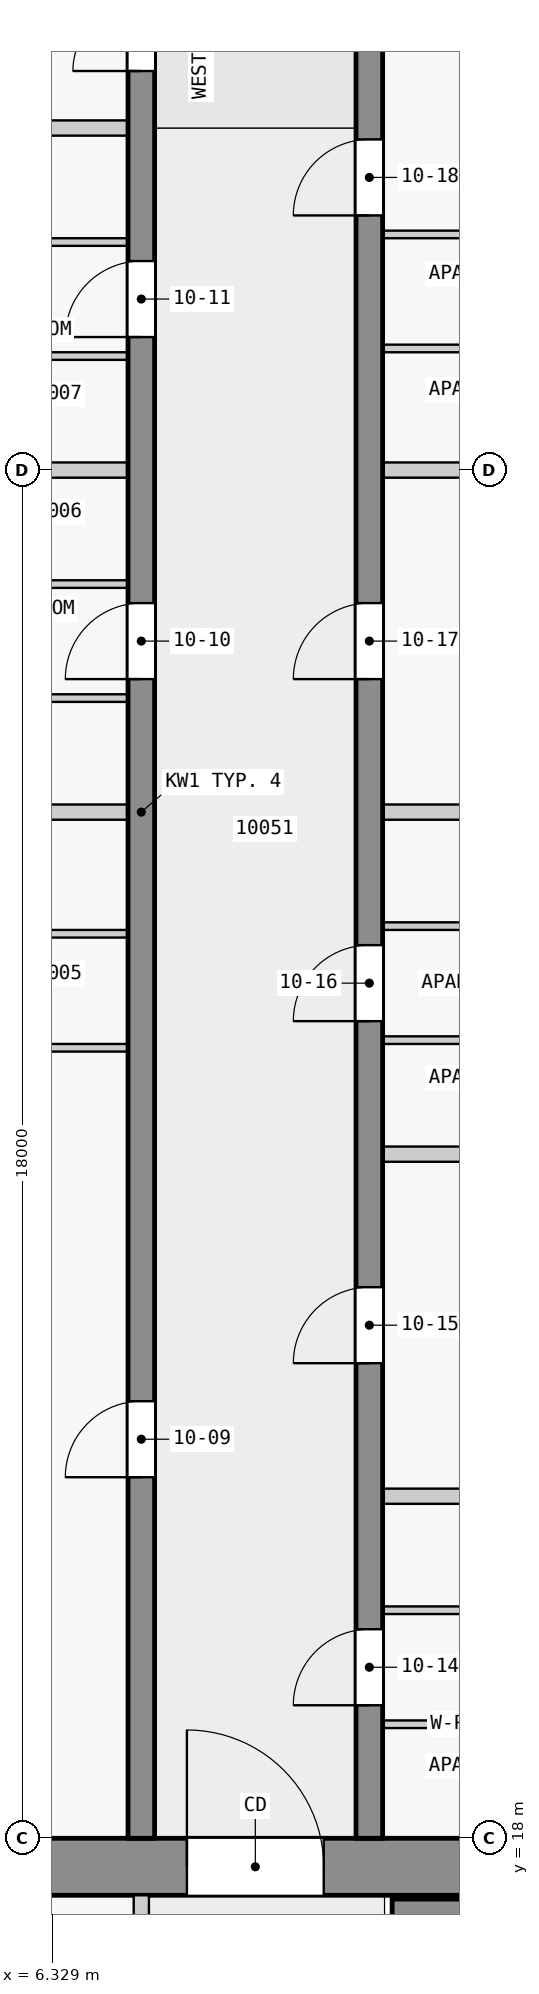
"""IFC4 building model, lengths in metres.
Left out: names, types, materials, properties, quantities, classifications, styles, units other than length and angle.
Written with IfcOpenShell. Run it as: python <this file> out.ifc"""

import sys

from ifc_helpers import new_model, si_unit, direction, frame, frame_2d, origin, place, context, subcontext, project, spatial, rectangle, extrude, element, fill, save


model = new_model("IFC4")
c1 = context("Model", 3, precision=1e-05, world=origin(), true_north=direction((0.0, 1.0)))
c2 = subcontext(c1, "Body", "Model", "MODEL_VIEW")
j1 = project(units=[si_unit("LENGTHUNIT", "METRE"), si_unit("PLANEANGLEUNIT", "RADIAN")], contexts=[c1])
p1 = place(None, origin())
s1 = spatial("IfcSite", under=j1, at=p1, CompositionType="ELEMENT")
p2 = place(p1, origin())
s2 = spatial("IfcBuilding", under=s1, at=p2, CompositionType="ELEMENT")
p3 = place(p2, frame((0.0, 0.0, 44.3)))
s3 = spatial("IfcBuildingStorey", under=s2, at=p3, CompositionType="ELEMENT", Elevation=44.3)
p4 = place(p3, frame((1.55, 17.625, 0.0), z_axis=(0.0, 0.0, 1.0), x_axis=(1.0, 0.0, 0.0)))
e1 = element("IfcWall", 1, at=p4, inside=s3, PredefinedType="SHEAR", context=c2, shape_type="SweptSolid", body=[
    extrude(rectangle(XDim=20.95, YDim=0.75, at=frame_2d((10.475, 0.0))), origin(), (0.0, 0.0, 1.0), 3.25),
])
p5 = place(p4, frame((6.55, 0.0, 0.0)))
e2 = element("IfcOpeningElement", 2, at=p5, cuts=e1, PredefinedType="OPENING", context=c2, shape_type="SweptSolid", body=[
    extrude(rectangle(XDim=1.8, YDim=2.1, at=frame_2d((0.9, 1.05))), frame((0.0, 0.385, 0.0), z_axis=(0.0, -1.0, 0.0), x_axis=(1.0, 0.0, 0.0)), (0.0, 0.0, 1.0), 0.77),
])
p6 = place(p3, frame((10.8, 17.05, 0.0), z_axis=(0.0, 0.0, 1.0), x_axis=(1.0, 0.0, 0.0)))
e3 = element("IfcWall", 3, at=p6, inside=s3, PredefinedType="SHEAR", context=c2, shape_type="SweptSolid", body=[
    extrude(rectangle(XDim=7.8, YDim=0.3, at=frame_2d((3.9, 0.0))), origin(), (0.0, 0.0, 1.0), 3.25),
])
p7 = place(p3, frame((7.5, 18.0, 0.0), z_axis=(0.0, 0.0, 1.0), x_axis=(0.0, 1.0, 0.0)))
e4 = element("IfcWall", 4, at=p7, inside=s3, PredefinedType="SHEAR", context=c2, shape_type="SweptSolid", body=[
    extrude(rectangle(XDim=27.0, YDim=0.35, at=frame_2d((13.5, 0.0))), origin(), (0.0, 0.0, 1.0), 3.25),
])
p8 = place(p7, frame((4.75, 0.0, 0.0)))
e5 = element("IfcOpeningElement", 5, at=p8, cuts=e4, PredefinedType="OPENING", context=c2, shape_type="SweptSolid", body=[
    extrude(rectangle(XDim=1.0, YDim=2.1, at=frame_2d((0.5, 1.05))), frame((0.0, 0.185, 0.0), z_axis=(0.0, -1.0, 0.0), x_axis=(1.0, 0.0, 0.0)), (0.0, 0.0, 1.0), 0.37),
])
p9 = place(p7, frame((15.25, 0.0, 0.0)))
e6 = element("IfcOpeningElement", 6, at=p9, cuts=e4, PredefinedType="OPENING", context=c2, shape_type="SweptSolid", body=[
    extrude(rectangle(XDim=1.0, YDim=2.1, at=frame_2d((0.5, 1.05))), frame((0.0, 0.185, 0.0), z_axis=(0.0, -1.0, 0.0), x_axis=(1.0, 0.0, 0.0)), (0.0, 0.0, 1.0), 0.37),
])
p10 = place(p7, frame((19.75, 0.0, 0.0)))
e7 = element("IfcOpeningElement", 7, at=p10, cuts=e4, PredefinedType="OPENING", context=c2, shape_type="SweptSolid", body=[
    extrude(rectangle(XDim=1.0, YDim=2.1, at=frame_2d((0.5, 1.05))), frame((0.0, 0.185, 0.0), z_axis=(0.0, -1.0, 0.0), x_axis=(1.0, 0.0, 0.0)), (0.0, 0.0, 1.0), 0.37),
])
p11 = place(p7, frame((23.25, 0.0, 0.0)))
e8 = element("IfcOpeningElement", 8, at=p11, cuts=e4, PredefinedType="OPENING", context=c2, shape_type="SweptSolid", body=[
    extrude(rectangle(XDim=0.9, YDim=2.1, at=frame_2d((0.45, 1.05))), frame((0.0, 0.185, 0.0), z_axis=(0.0, -1.0, 0.0), x_axis=(1.0, 0.0, 0.0)), (0.0, 0.0, 1.0), 0.37),
])
p12 = place(p7, frame((25.45, 0.0, 0.0)))
e9 = element("IfcOpeningElement", 9, at=p12, cuts=e4, PredefinedType="OPENING", context=c2, shape_type="SweptSolid", body=[
    extrude(rectangle(XDim=1.0, YDim=2.1, at=frame_2d((0.5, 1.05))), frame((0.0, 0.185, 0.0), z_axis=(0.0, -1.0, 0.0), x_axis=(1.0, 0.0, 0.0)), (0.0, 0.0, 1.0), 0.37),
])
p13 = place(p3, frame((10.5, 18.0, 0.0), z_axis=(0.0, 0.0, 1.0), x_axis=(0.0, 1.0, 0.0)))
e10 = element("IfcWall", 10, at=p13, inside=s3, PredefinedType="SHEAR", context=c2, shape_type="SweptSolid", body=[
    extrude(rectangle(XDim=27.0, YDim=0.35, at=frame_2d((13.5, 0.0))), origin(), (0.0, 0.0, 1.0), 3.25),
])
p14 = place(p13, frame((1.75, 0.0, 0.0)))
e11 = element("IfcOpeningElement", 11, at=p14, cuts=e10, PredefinedType="OPENING", context=c2, shape_type="SweptSolid", body=[
    extrude(rectangle(XDim=1.0, YDim=2.1, at=frame_2d((0.5, 1.05))), frame((0.0, 0.185, 0.0), z_axis=(0.0, -1.0, 0.0), x_axis=(1.0, 0.0, 0.0)), (0.0, 0.0, 1.0), 0.37),
])
p15 = place(p13, frame((6.25, 0.0, 0.0)))
e12 = element("IfcOpeningElement", 12, at=p15, cuts=e10, PredefinedType="OPENING", context=c2, shape_type="SweptSolid", body=[
    extrude(rectangle(XDim=1.0, YDim=2.1, at=frame_2d((0.5, 1.05))), frame((0.0, 0.185, 0.0), z_axis=(0.0, -1.0, 0.0), x_axis=(1.0, 0.0, 0.0)), (0.0, 0.0, 1.0), 0.37),
])
p16 = place(p13, frame((10.75, 0.0, 0.0)))
e13 = element("IfcOpeningElement", 13, at=p16, cuts=e10, PredefinedType="OPENING", context=c2, shape_type="SweptSolid", body=[
    extrude(rectangle(XDim=1.0, YDim=2.1, at=frame_2d((0.5, 1.05))), frame((0.0, 0.185, 0.0), z_axis=(0.0, -1.0, 0.0), x_axis=(1.0, 0.0, 0.0)), (0.0, 0.0, 1.0), 0.37),
])
p17 = place(p13, frame((15.25, 0.0, 0.0)))
e14 = element("IfcOpeningElement", 14, at=p17, cuts=e10, PredefinedType="OPENING", context=c2, shape_type="SweptSolid", body=[
    extrude(rectangle(XDim=1.0, YDim=2.1, at=frame_2d((0.5, 1.05))), frame((0.0, 0.185, 0.0), z_axis=(0.0, -1.0, 0.0), x_axis=(1.0, 0.0, 0.0)), (0.0, 0.0, 1.0), 0.37),
])
p18 = place(p13, frame((21.35, 0.0, 0.0)))
e15 = element("IfcOpeningElement", 15, at=p18, cuts=e10, PredefinedType="OPENING", context=c2, shape_type="SweptSolid", body=[
    extrude(rectangle(XDim=1.0, YDim=2.1, at=frame_2d((0.5, 1.05))), frame((0.0, 0.185, 0.0), z_axis=(0.0, -1.0, 0.0), x_axis=(1.0, 0.0, 0.0)), (0.0, 0.0, 1.0), 0.37),
])
p19 = place(p3, frame((7.5, 10.1, 0.0), z_axis=(0.0, 0.0, 1.0), x_axis=(0.0, 1.0, 0.0)))
e16 = element("IfcWall", 16, at=p19, inside=s3, PredefinedType="PARTITIONING", context=c2, shape_type="SweptSolid", body=[
    extrude(rectangle(XDim=7.15, YDim=0.2, at=frame_2d((3.575, 0.0))), origin(), (0.0, 0.0, 1.0), 3.25),
])
p20 = place(p19, frame((0.775, 0.0, 0.0)))
e17 = element("IfcOpeningElement", 17, at=p20, cuts=e16, PredefinedType="OPENING", context=c2, shape_type="SweptSolid", body=[
    extrude(rectangle(XDim=0.9, YDim=2.1, at=frame_2d((0.45, 1.05))), frame((0.0, 0.11, 0.0), z_axis=(0.0, -1.0, 0.0), x_axis=(1.0, 0.0, 0.0)), (0.0, 0.0, 1.0), 0.22),
])
p21 = place(p19, frame((3.225, 0.0, 0.0)))
e18 = element("IfcOpeningElement", 18, at=p21, cuts=e16, PredefinedType="OPENING", context=c2, shape_type="SweptSolid", body=[
    extrude(rectangle(XDim=0.9, YDim=2.1, at=frame_2d((0.45, 1.05))), frame((0.0, 0.11, 0.0), z_axis=(0.0, -1.0, 0.0), x_axis=(1.0, 0.0, 0.0)), (0.0, 0.0, 1.0), 0.22),
])
p22 = place(p19, frame((5.25, 0.0, 0.0)))
e19 = element("IfcOpeningElement", 19, at=p22, cuts=e16, PredefinedType="OPENING", context=c2, shape_type="SweptSolid", body=[
    extrude(rectangle(XDim=0.9, YDim=2.1, at=frame_2d((0.45, 1.05))), frame((0.0, 0.11, 0.0), z_axis=(0.0, -1.0, 0.0), x_axis=(1.0, 0.0, 0.0)), (0.0, 0.0, 1.0), 0.22),
])
p23 = place(p3, frame((14.075, 19.5, 0.0), z_axis=(0.0, 0.0, 1.0), x_axis=(-1.0, 0.0, 0.0)))
e20 = element("IfcWall", 20, at=p23, inside=s3, PredefinedType="PARTITIONING", context=c2, shape_type="SweptSolid", body=[
    extrude(rectangle(XDim=3.4, YDim=0.1, at=frame_2d((1.7, 0.0))), origin(), (0.0, 0.0, 1.0), 3.25),
])
p24 = place(p23, frame((1.25, 0.0, 0.0)))
e21 = element("IfcOpeningElement", 21, at=p24, cuts=e20, PredefinedType="OPENING", context=c2, shape_type="SweptSolid", body=[
    extrude(rectangle(XDim=0.9, YDim=2.1, at=frame_2d((0.45, 1.05))), frame((0.0, 0.06, 0.0), z_axis=(0.0, -1.0, 0.0), x_axis=(1.0, 0.0, 0.0)), (0.0, 0.0, 1.0), 0.12),
])
p25 = place(p3, frame((10.675, 21.0, 0.0), z_axis=(0.0, 0.0, 1.0), x_axis=(1.0, 0.0, 0.0)))
e22 = element("IfcWall", 22, at=p25, inside=s3, PredefinedType="PARTITIONING", context=c2, shape_type="SweptSolid", body=[
    extrude(rectangle(XDim=3.4, YDim=0.1, at=frame_2d((1.7, 0.0))), origin(), (0.0, 0.0, 1.0), 3.25),
])
p26 = place(p25, frame((1.25, 0.0, 0.0)))
e23 = element("IfcOpeningElement", 23, at=p26, cuts=e22, PredefinedType="OPENING", context=c2, shape_type="SweptSolid", body=[
    extrude(rectangle(XDim=0.9, YDim=2.1, at=frame_2d((0.45, 1.05))), frame((0.0, 0.06, 0.0), z_axis=(0.0, -1.0, 0.0), x_axis=(1.0, 0.0, 0.0)), (0.0, 0.0, 1.0), 0.12),
])
p27 = place(p3, frame((13.975, 22.5, 0.0), z_axis=(0.0, 0.0, 1.0), x_axis=(-1.0, 0.0, 0.0)))
e24 = element("IfcWall", 24, at=p27, inside=s3, PredefinedType="PARTITIONING", context=c2, shape_type="SweptSolid", body=[
    extrude(rectangle(XDim=3.3, YDim=0.2, at=frame_2d((1.65, 0.0))), origin(), (0.0, 0.0, 1.0), 3.25),
])
p28 = place(p3, frame((18.08, 27.0, 0.0), z_axis=(0.0, 0.0, 1.0), x_axis=(-1.0, 0.0, 0.0)))
e25 = element("IfcWall", 25, at=p28, inside=s3, PredefinedType="PARTITIONING", context=c2, shape_type="SweptSolid", body=[
    extrude(rectangle(XDim=7.405, YDim=0.2, at=frame_2d((3.703, 0.0))), origin(), (0.0, 0.0, 1.0), 3.25),
])
p29 = place(p3, frame((3.975, 28.4, 0.0), z_axis=(0.0, 0.0, 1.0), x_axis=(1.0, 0.0, 0.0)))
e26 = element("IfcWall", 26, at=p29, inside=s3, PredefinedType="PARTITIONING", context=c2, shape_type="SweptSolid", body=[
    extrude(rectangle(XDim=3.35, YDim=0.1, at=frame_2d((1.675, 0.0))), origin(), (0.0, 0.0, 1.0), 3.25),
])
p30 = place(p29, frame((1.25, 0.0, 0.0)))
e27 = element("IfcOpeningElement", 27, at=p30, cuts=e26, PredefinedType="OPENING", context=c2, shape_type="SweptSolid", body=[
    extrude(rectangle(XDim=0.9, YDim=2.1, at=frame_2d((0.45, 1.05))), frame((0.0, 0.06, 0.0), z_axis=(0.0, -1.0, 0.0), x_axis=(1.0, 0.0, 0.0)), (0.0, 0.0, 1.0), 0.12),
])
p31 = place(p3, frame((14.075, 28.5, 0.0), z_axis=(0.0, 0.0, 1.0), x_axis=(-1.0, 0.0, 0.0)))
e28 = element("IfcWall", 28, at=p31, inside=s3, PredefinedType="PARTITIONING", context=c2, shape_type="SweptSolid", body=[
    extrude(rectangle(XDim=3.4, YDim=0.1, at=frame_2d((1.7, 0.0))), origin(), (0.0, 0.0, 1.0), 3.25),
])
p32 = place(p31, frame((1.25, 0.0, 0.0)))
e29 = element("IfcOpeningElement", 29, at=p32, cuts=e28, PredefinedType="OPENING", context=c2, shape_type="SweptSolid", body=[
    extrude(rectangle(XDim=0.9, YDim=2.1, at=frame_2d((0.45, 1.05))), frame((0.0, 0.06, 0.0), z_axis=(0.0, -1.0, 0.0), x_axis=(1.0, 0.0, 0.0)), (0.0, 0.0, 1.0), 0.12),
])
p33 = place(p3, frame((7.325, 29.9, 0.0), z_axis=(0.0, 0.0, 1.0), x_axis=(-1.0, 0.0, 0.0)))
e30 = element("IfcWall", 30, at=p33, inside=s3, PredefinedType="PARTITIONING", context=c2, shape_type="SweptSolid", body=[
    extrude(rectangle(XDim=3.35, YDim=0.1, at=frame_2d((1.675, 0.0))), origin(), (0.0, 0.0, 1.0), 3.25),
])
p34 = place(p3, frame((10.675, 30.0, 0.0), z_axis=(0.0, 0.0, 1.0), x_axis=(1.0, 0.0, 0.0)))
e31 = element("IfcWall", 31, at=p34, inside=s3, PredefinedType="PARTITIONING", context=c2, shape_type="SweptSolid", body=[
    extrude(rectangle(XDim=3.4, YDim=0.1, at=frame_2d((1.7, 0.0))), origin(), (0.0, 0.0, 1.0), 3.25),
])
p35 = place(p34, frame((1.25, 0.0, 0.0)))
e32 = element("IfcOpeningElement", 32, at=p35, cuts=e31, PredefinedType="OPENING", context=c2, shape_type="SweptSolid", body=[
    extrude(rectangle(XDim=0.9, YDim=2.1, at=frame_2d((0.45, 1.05))), frame((0.0, 0.06, 0.0), z_axis=(0.0, -1.0, 0.0), x_axis=(1.0, 0.0, 0.0)), (0.0, 0.0, 1.0), 0.12),
])
for number, where, z_axis, x_axis in (
    (33, (7.325, 31.5, 0.0), (0.0, 0.0, 1.0), (-1.0, 0.0, 0.0)),
    (34, (13.975, 31.5, 0.0), (0.0, 0.0, 1.0), (-1.0, 0.0, 0.0)),
):
    element("IfcWall", number, at=place(p3, frame(where, z_axis=z_axis, x_axis=x_axis)), inside=s3, PredefinedType="PARTITIONING", context=c2, shape_type="SweptSolid", body=[
        extrude(rectangle(XDim=3.3, YDim=0.2, at=frame_2d((1.65, 0.0))), origin(), (0.0, 0.0, 1.0), 3.25),
    ])
p36 = place(p3, frame((7.325, 33.0, 0.0), z_axis=(0.0, 0.0, 1.0), x_axis=(-1.0, 0.0, 0.0)))
e35 = element("IfcWall", 35, at=p36, inside=s3, PredefinedType="PARTITIONING", context=c2, shape_type="SweptSolid", body=[
    extrude(rectangle(XDim=3.35, YDim=0.1, at=frame_2d((1.675, 0.0))), origin(), (0.0, 0.0, 1.0), 3.25),
])
p37 = place(p36, frame((1.25, 0.0, 0.0)))
e36 = element("IfcOpeningElement", 36, at=p37, cuts=e35, PredefinedType="OPENING", context=c2, shape_type="SweptSolid", body=[
    extrude(rectangle(XDim=0.9, YDim=2.1, at=frame_2d((0.45, 1.05))), frame((0.0, 0.06, 0.0), z_axis=(0.0, -1.0, 0.0), x_axis=(1.0, 0.0, 0.0)), (0.0, 0.0, 1.0), 0.12),
])
p38 = place(p3, frame((3.925, 34.5, 0.0), z_axis=(0.0, 0.0, 1.0), x_axis=(1.0, 0.0, 0.0)))
e37 = element("IfcWall", 37, at=p38, inside=s3, PredefinedType="PARTITIONING", context=c2, shape_type="SweptSolid", body=[
    extrude(rectangle(XDim=3.4, YDim=0.1, at=frame_2d((1.7, 0.0))), origin(), (0.0, 0.0, 1.0), 3.25),
])
p39 = place(p38, frame((1.25, 0.0, 0.0)))
e38 = element("IfcOpeningElement", 38, at=p39, cuts=e37, PredefinedType="OPENING", context=c2, shape_type="SweptSolid", body=[
    extrude(rectangle(XDim=0.9, YDim=2.1, at=frame_2d((0.45, 1.05))), frame((0.0, 0.06, 0.0), z_axis=(0.0, -1.0, 0.0), x_axis=(1.0, 0.0, 0.0)), (0.0, 0.0, 1.0), 0.12),
])
p40 = place(p3, frame((7.325, 36.0, 0.0), z_axis=(0.0, 0.0, 1.0), x_axis=(-1.0, 0.0, 0.0)))
e39 = element("IfcWall", 39, at=p40, inside=s3, PredefinedType="PARTITIONING", context=c2, shape_type="SweptSolid", body=[
    extrude(rectangle(XDim=3.4, YDim=0.2, at=frame_2d((1.7, 0.0))), origin(), (0.0, 0.0, 1.0), 3.25),
])
p41 = place(p3, frame((16.6, 36.0, 0.0), z_axis=(0.0, 0.0, 1.0), x_axis=(-1.0, 0.0, 0.0)))
e40 = element("IfcWall", 40, at=p41, inside=s3, PredefinedType="PARTITIONING", context=c2, shape_type="SweptSolid", body=[
    extrude(rectangle(XDim=5.925, YDim=0.2, at=frame_2d((2.962, 0.0))), origin(), (0.0, 0.0, 1.0), 3.25),
])
p42 = place(p3, frame((7.325, 37.5, 0.0), z_axis=(0.0, 0.0, 1.0), x_axis=(-1.0, 0.0, 0.0)))
e41 = element("IfcWall", 41, at=p42, inside=s3, PredefinedType="PARTITIONING", context=c2, shape_type="SweptSolid", body=[
    extrude(rectangle(XDim=3.4, YDim=0.1, at=frame_2d((1.7, 0.0))), origin(), (0.0, 0.0, 1.0), 3.25),
])
p43 = place(p42, frame((1.25, 0.0, 0.0)))
e42 = element("IfcOpeningElement", 42, at=p43, cuts=e41, PredefinedType="OPENING", context=c2, shape_type="SweptSolid", body=[
    extrude(rectangle(XDim=0.9, YDim=2.1, at=frame_2d((0.45, 1.05))), frame((0.0, 0.06, 0.0), z_axis=(0.0, -1.0, 0.0), x_axis=(1.0, 0.0, 0.0)), (0.0, 0.0, 1.0), 0.12),
])
p44 = place(p3, frame((14.075, 37.6, 0.0), z_axis=(0.0, 0.0, 1.0), x_axis=(-1.0, 0.0, 0.0)))
e43 = element("IfcWall", 43, at=p44, inside=s3, PredefinedType="PARTITIONING", context=c2, shape_type="SweptSolid", body=[
    extrude(rectangle(XDim=3.4, YDim=0.1, at=frame_2d((1.7, 0.0))), origin(), (0.0, 0.0, 1.0), 3.25),
])
p45 = place(p3, frame((3.925, 39.0, 0.0), z_axis=(0.0, 0.0, 1.0), x_axis=(1.0, 0.0, 0.0)))
e44 = element("IfcWall", 44, at=p45, inside=s3, PredefinedType="PARTITIONING", context=c2, shape_type="SweptSolid", body=[
    extrude(rectangle(XDim=3.4, YDim=0.1, at=frame_2d((1.7, 0.0))), origin(), (0.0, 0.0, 1.0), 3.25),
])
p46 = place(p45, frame((1.25, 0.0, 0.0)))
e45 = element("IfcOpeningElement", 45, at=p46, cuts=e44, PredefinedType="OPENING", context=c2, shape_type="SweptSolid", body=[
    extrude(rectangle(XDim=0.9, YDim=2.1, at=frame_2d((0.45, 1.05))), frame((0.0, 0.06, 0.0), z_axis=(0.0, -1.0, 0.0), x_axis=(1.0, 0.0, 0.0)), (0.0, 0.0, 1.0), 0.12),
])
p47 = place(p3, frame((14.075, 39.1, 0.0), z_axis=(0.0, 0.0, 1.0), x_axis=(-1.0, 0.0, 0.0)))
e46 = element("IfcWall", 46, at=p47, inside=s3, PredefinedType="PARTITIONING", context=c2, shape_type="SweptSolid", body=[
    extrude(rectangle(XDim=3.4, YDim=0.1, at=frame_2d((1.7, 0.0))), origin(), (0.0, 0.0, 1.0), 3.25),
])
p48 = place(p47, frame((1.25, 0.0, 0.0)))
e47 = element("IfcOpeningElement", 47, at=p48, cuts=e46, PredefinedType="OPENING", context=c2, shape_type="SweptSolid", body=[
    extrude(rectangle(XDim=0.9, YDim=2.1, at=frame_2d((0.45, 1.05))), frame((0.0, 0.06, 0.0), z_axis=(0.0, -1.0, 0.0), x_axis=(1.0, 0.0, 0.0)), (0.0, 0.0, 1.0), 0.12),
])
p49 = place(p3, frame((7.325, 40.5, 0.0), z_axis=(0.0, 0.0, 1.0), x_axis=(-1.0, 0.0, 0.0)))
e48 = element("IfcWall", 48, at=p49, inside=s3, PredefinedType="PARTITIONING", context=c2, shape_type="SweptSolid", body=[
    extrude(rectangle(XDim=3.3, YDim=0.2, at=frame_2d((1.65, 0.0))), origin(), (0.0, 0.0, 1.0), 3.25),
])
p50 = place(p5, origin())
e49 = element("IfcDoor", 49, at=p50, inside=s3, OperationType="DOUBLE_DOOR_SINGLE_SWING", PredefinedType="DOOR", context=c2, shape_type="SweptSolid", body=[
    extrude(rectangle(XDim=1.8, YDim=2.1, at=frame_2d((0.9, 1.05))), frame((0.0, 0.025, 0.0), z_axis=(0.0, -1.0, 0.0), x_axis=(1.0, 0.0, 0.0)), (0.0, 0.0, 1.0), 0.05),
])
fill(e2, e49)
p51 = place(p8, origin())
e50 = element("IfcDoor", 50, at=p51, inside=s3, OperationType="SINGLE_SWING_LEFT", PredefinedType="DOOR", context=c2, shape_type="SweptSolid", body=[
    extrude(rectangle(XDim=1.0, YDim=2.1, at=frame_2d((0.5, 1.05))), frame((0.0, 0.025, 0.0), z_axis=(0.0, -1.0, 0.0), x_axis=(1.0, 0.0, 0.0)), (0.0, 0.0, 1.0), 0.05),
])
fill(e5, e50)
p52 = place(p9, origin())
e51 = element("IfcDoor", 51, at=p52, inside=s3, OperationType="SINGLE_SWING_RIGHT", PredefinedType="DOOR", context=c2, shape_type="SweptSolid", body=[
    extrude(rectangle(XDim=1.0, YDim=2.1, at=frame_2d((0.5, 1.05))), frame((0.0, 0.025, 0.0), z_axis=(0.0, -1.0, 0.0), x_axis=(1.0, 0.0, 0.0)), (0.0, 0.0, 1.0), 0.05),
])
fill(e6, e51)
p53 = place(p10, origin())
e52 = element("IfcDoor", 52, at=p53, inside=s3, OperationType="SINGLE_SWING_RIGHT", PredefinedType="DOOR", context=c2, shape_type="SweptSolid", body=[
    extrude(rectangle(XDim=1.0, YDim=2.1, at=frame_2d((0.5, 1.05))), frame((0.0, 0.025, 0.0), z_axis=(0.0, -1.0, 0.0), x_axis=(1.0, 0.0, 0.0)), (0.0, 0.0, 1.0), 0.05),
])
fill(e7, e52)
p54 = place(p11, origin())
e53 = element("IfcDoor", 53, at=p54, inside=s3, OperationType="SINGLE_SWING_RIGHT", PredefinedType="DOOR", context=c2, shape_type="SweptSolid", body=[
    extrude(rectangle(XDim=0.9, YDim=2.1, at=frame_2d((0.45, 1.05))), frame((0.0, 0.025, 0.0), z_axis=(0.0, -1.0, 0.0), x_axis=(1.0, 0.0, 0.0)), (0.0, 0.0, 1.0), 0.05),
])
fill(e8, e53)
p55 = place(p14, origin())
e54 = element("IfcDoor", 54, at=p55, inside=s3, OperationType="SINGLE_SWING_LEFT", PredefinedType="DOOR", context=c2, shape_type="SweptSolid", body=[
    extrude(rectangle(XDim=1.0, YDim=2.1, at=frame_2d((0.5, 1.05))), frame((0.0, 0.025, 0.0), z_axis=(0.0, -1.0, 0.0), x_axis=(1.0, 0.0, 0.0)), (0.0, 0.0, 1.0), 0.05),
])
fill(e11, e54)
p56 = place(p15, origin())
e55 = element("IfcDoor", 55, at=p56, inside=s3, OperationType="SINGLE_SWING_LEFT", PredefinedType="DOOR", context=c2, shape_type="SweptSolid", body=[
    extrude(rectangle(XDim=1.0, YDim=2.1, at=frame_2d((0.5, 1.05))), frame((0.0, 0.025, 0.0), z_axis=(0.0, -1.0, 0.0), x_axis=(1.0, 0.0, 0.0)), (0.0, 0.0, 1.0), 0.05),
])
fill(e12, e55)
p57 = place(p16, origin())
e56 = element("IfcDoor", 56, at=p57, inside=s3, OperationType="SINGLE_SWING_LEFT", PredefinedType="DOOR", context=c2, shape_type="SweptSolid", body=[
    extrude(rectangle(XDim=1.0, YDim=2.1, at=frame_2d((0.5, 1.05))), frame((0.0, 0.025, 0.0), z_axis=(0.0, -1.0, 0.0), x_axis=(1.0, 0.0, 0.0)), (0.0, 0.0, 1.0), 0.05),
])
fill(e13, e56)
p58 = place(p17, origin())
e57 = element("IfcDoor", 57, at=p58, inside=s3, OperationType="SINGLE_SWING_RIGHT", PredefinedType="DOOR", context=c2, shape_type="SweptSolid", body=[
    extrude(rectangle(XDim=1.0, YDim=2.1, at=frame_2d((0.5, 1.05))), frame((0.0, 0.025, 0.0), z_axis=(0.0, -1.0, 0.0), x_axis=(1.0, 0.0, 0.0)), (0.0, 0.0, 1.0), 0.05),
])
fill(e14, e57)
p59 = place(p18, origin())
e58 = element("IfcDoor", 58, at=p59, inside=s3, OperationType="SINGLE_SWING_RIGHT", PredefinedType="DOOR", context=c2, shape_type="SweptSolid", body=[
    extrude(rectangle(XDim=1.0, YDim=2.1, at=frame_2d((0.5, 1.05))), frame((0.0, 0.025, 0.0), z_axis=(0.0, -1.0, 0.0), x_axis=(1.0, 0.0, 0.0)), (0.0, 0.0, 1.0), 0.05),
])
fill(e15, e58)
save(model, sys.argv[1])
